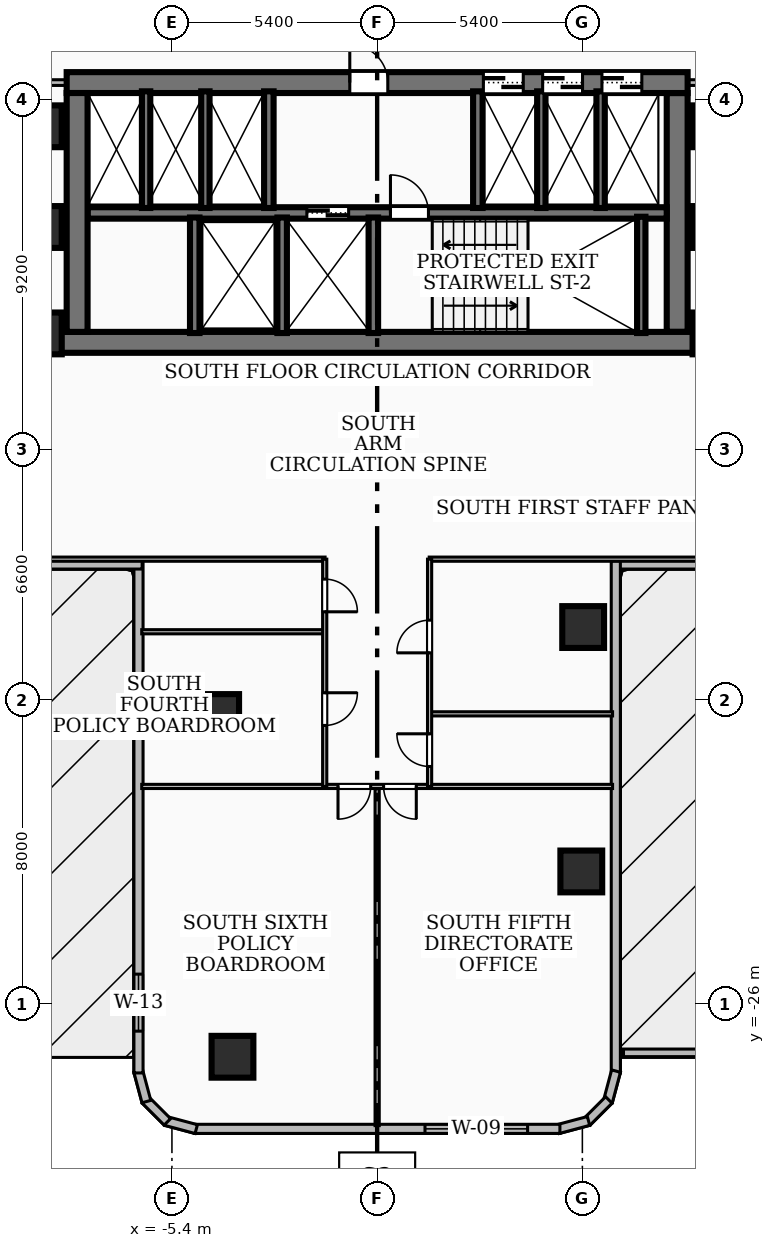
"""IFC4 building model, lengths in metres.
Left out: names, types, materials, properties, quantities, classifications, styles, units other than length and angle.
Written with IfcOpenShell. Run it as: python <this file> out.ifc"""

import sys

from ifc_helpers import new_model, si_unit, direction, frame, frame_2d, origin, origin_2d, place, context, subcontext, project, spatial, rectangle, extrude, element, fill, save


model = new_model("IFC4")
c1 = context("Model", 3, precision=1e-05, world=origin(), true_north=direction((0.0, 1.0)))
c2 = subcontext(c1, "Body", "Model", "MODEL_VIEW")
j1 = project(units=[si_unit("LENGTHUNIT", "METRE"), si_unit("PLANEANGLEUNIT", "RADIAN")], contexts=[c1])
p1 = place(None, origin())
s1 = spatial("IfcSite", under=j1, at=p1, CompositionType="ELEMENT")
p2 = place(p1, origin())
s2 = spatial("IfcBuilding", under=s1, at=p2, CompositionType="ELEMENT")
p3 = place(p2, frame((0.0, 0.0, 24.48)))
s3 = spatial("IfcBuildingStorey", under=s2, at=p3, CompositionType="ELEMENT", Elevation=24.48)
p4 = place(p3, frame((8.78, -8.585, 0.0), z_axis=(0.0, 0.0, 1.0), x_axis=(-1.0, 0.0, 0.0)))
e1 = element("IfcWall", 1, at=p4, inside=s3, PredefinedType="SHEAR", context=c2, shape_type="SweptSolid", body=[
    extrude(rectangle(XDim=17.56, YDim=0.55, at=frame_2d((8.78, 0.0))), origin(), (0.0, 0.0, 1.0), 3.34),
])
p5 = place(p3, frame((-8.17, -1.75, 0.0), z_axis=(0.0, 0.0, 1.0), x_axis=(1.0, 0.0, 0.0)))
e2 = element("IfcWall", 2, at=p5, inside=s3, PredefinedType="SHEAR", context=c2, shape_type="SweptSolid", body=[
    extrude(rectangle(XDim=16.34, YDim=0.55, at=frame_2d((8.17, 0.0))), origin(), (0.0, 0.0, 1.0), 3.34),
])
p6 = place(p5, frame((7.45, 0.0, 0.0)))
e3 = element("IfcOpeningElement", 3, at=p6, cuts=e2, PredefinedType="OPENING", context=c2, shape_type="SweptSolid", body=[
    extrude(rectangle(XDim=1.0, YDim=2.1, at=frame_2d((0.5, 1.05))), frame((0.0, 0.285, 0.0), z_axis=(0.0, -1.0, 0.0), x_axis=(1.0, 0.0, 0.0)), (0.0, 0.0, 1.0), 0.57),
])
p7 = place(p5, frame((10.965, 0.0, 0.0)))
e4 = element("IfcOpeningElement", 4, at=p7, cuts=e2, PredefinedType="OPENING", context=c2, shape_type="SweptSolid", body=[
    extrude(rectangle(XDim=1.05, YDim=2.15, at=frame_2d((0.525, 1.075))), frame((0.0, 0.285, 0.0), z_axis=(0.0, -1.0, 0.0), x_axis=(1.0, 0.0, 0.0)), (0.0, 0.0, 1.0), 0.57),
])
p8 = place(p5, frame((12.525, 0.0, 0.0)))
e5 = element("IfcOpeningElement", 5, at=p8, cuts=e2, PredefinedType="OPENING", context=c2, shape_type="SweptSolid", body=[
    extrude(rectangle(XDim=1.05, YDim=2.15, at=frame_2d((0.525, 1.075))), frame((0.0, 0.285, 0.0), z_axis=(0.0, -1.0, 0.0), x_axis=(1.0, 0.0, 0.0)), (0.0, 0.0, 1.0), 0.57),
])
p9 = place(p5, frame((14.085, 0.0, 0.0)))
e6 = element("IfcOpeningElement", 6, at=p9, cuts=e2, PredefinedType="OPENING", context=c2, shape_type="SweptSolid", body=[
    extrude(rectangle(XDim=1.05, YDim=2.15, at=frame_2d((0.525, 1.075))), frame((0.0, 0.285, 0.0), z_axis=(0.0, -1.0, 0.0), x_axis=(1.0, 0.0, 0.0)), (0.0, 0.0, 1.0), 0.57),
])
for number, where, z_axis, x_axis in (
    (7, (-7.895, -8.31, 0.0), (0.0, 0.0, 1.0), (0.0, 1.0, 0.0)),
    (8, (7.895, -2.025, 0.0), (0.0, 0.0, 1.0), (0.0, -1.0, 0.0)),
):
    element("IfcWall", number, at=place(p3, frame(where, z_axis=z_axis, x_axis=x_axis)), inside=s3, PredefinedType="SHEAR", context=c2, shape_type="SweptSolid", body=[
        extrude(rectangle(XDim=6.285, YDim=0.55, at=frame_2d((3.143, 0.0))), origin(), (0.0, 0.0, 1.0), 3.34),
    ])
p10 = place(p3, frame((-7.62, -5.18, 0.0), z_axis=(0.0, 0.0, 1.0), x_axis=(1.0, 0.0, 0.0)))
e9 = element("IfcWall", 9, at=p10, inside=s3, PredefinedType="SOLIDWALL", context=c2, shape_type="SweptSolid", body=[
    extrude(rectangle(XDim=15.24, YDim=0.3, at=frame_2d((7.62, 0.0))), origin(), (0.0, 0.0, 1.0), 3.34),
])
p11 = place(p10, frame((5.77, 0.0, 0.0)))
e10 = element("IfcOpeningElement", 10, at=p11, cuts=e9, PredefinedType="OPENING", context=c2, shape_type="SweptSolid", body=[
    extrude(rectangle(XDim=1.1, YDim=2.15, at=frame_2d((0.55, 1.075))), frame((0.0, 0.16, 0.0), z_axis=(0.0, -1.0, 0.0), x_axis=(1.0, 0.0, 0.0)), (0.0, 0.0, 1.0), 0.32),
])
p12 = place(p10, frame((7.97, 0.0, 0.0)))
e11 = element("IfcOpeningElement", 11, at=p12, cuts=e9, PredefinedType="OPENING", context=c2, shape_type="SweptSolid", body=[
    extrude(rectangle(XDim=1.0, YDim=2.1, at=frame_2d((0.5, 1.05))), frame((0.0, 0.16, 0.0), z_axis=(0.0, -1.0, 0.0), x_axis=(1.0, 0.0, 0.0)), (0.0, 0.0, 1.0), 0.32),
])
p13 = place(p3, frame((6.95, -8.34, 0.0), z_axis=(0.0, 0.0, 1.0), x_axis=(0.0, 1.0, 0.0)))
e12 = element("IfcWall", 12, at=p13, inside=s3, PredefinedType="SOLIDWALL", context=c2, shape_type="SweptSolid", body=[
    extrude(rectangle(XDim=3.06, YDim=0.22, at=frame_2d((1.53, 0.0))), origin(), (0.0, 0.0, 1.0), 3.34),
])
for number, where, z_axis, x_axis in (
    (13, (-0.1, -8.34, 0.0), (0.0, 0.0, 1.0), (0.0, 1.0, 0.0)),
    (14, (-2.5, -8.34, 0.0), (0.0, 0.0, 1.0), (0.0, 1.0, 0.0)),
    (15, (-4.8, -8.34, 0.0), (0.0, 0.0, 1.0), (0.0, 1.0, 0.0)),
):
    element("IfcWall", number, at=place(p3, frame(where, z_axis=z_axis, x_axis=x_axis)), inside=s3, PredefinedType="SOLIDWALL", context=c2, shape_type="SweptSolid", body=[
        extrude(rectangle(XDim=3.04, YDim=0.25, at=frame_2d((1.52, 0.0))), origin(), (0.0, 0.0, 1.0), 3.34),
    ])
for number, where, z_axis, x_axis in (
    (16, (-2.85, -5.05, 0.0), (0.0, 0.0, 1.0), (0.0, 1.0, 0.0)),
    (17, (2.65, -5.05, 0.0), (0.0, 0.0, 1.0), (0.0, 1.0, 0.0)),
):
    element("IfcWall", number, at=place(p3, frame(where, z_axis=z_axis, x_axis=x_axis)), inside=s3, PredefinedType="SOLIDWALL", context=c2, shape_type="SweptSolid", body=[
        extrude(rectangle(XDim=3.07, YDim=0.25, at=frame_2d((1.535, 0.0))), origin(), (0.0, 0.0, 1.0), 3.34),
    ])
for number, where, z_axis, x_axis in (
    (18, (4.32, -5.05, 0.0), (0.0, 0.0, 1.0), (0.0, 1.0, 0.0)),
    (19, (5.88, -5.05, 0.0), (0.0, 0.0, 1.0), (0.0, 1.0, 0.0)),
    (20, (-6.08, -5.05, 0.0), (0.0, 0.0, 1.0), (0.0, 1.0, 0.0)),
    (21, (-4.52, -5.05, 0.0), (0.0, 0.0, 1.0), (0.0, 1.0, 0.0)),
):
    element("IfcWall", number, at=place(p3, frame(where, z_axis=z_axis, x_axis=x_axis)), inside=s3, PredefinedType="SOLIDWALL", context=c2, shape_type="SweptSolid", body=[
        extrude(rectangle(XDim=3.07, YDim=0.22, at=frame_2d((1.535, 0.0))), origin(), (0.0, 0.0, 1.0), 3.34),
    ])
for number, where, z_axis, x_axis in (
    (22, (-8.85, -5.55, 0.0), (0.0, 0.0, 1.0), (1.0, 0.0, 0.0)),
    (23, (-8.85, -2.9, 0.0), (0.0, 0.0, 1.0), (1.0, 0.0, 0.0)),
    (24, (8.85, -5.55, 0.0), (0.0, 0.0, 1.0), (1.0, 0.0, 0.0)),
    (25, (8.85, -2.9, 0.0), (0.0, 0.0, 1.0), (1.0, 0.0, 0.0)),
    (26, (8.85, -8.35, 0.0), (0.0, 0.0, 1.0), (1.0, 0.0, 0.0)),
    (27, (-8.85, -8.35, 0.0), (0.0, 0.0, 1.0), (1.0, 0.0, 0.0)),
    (28, (-4.184, -18.391, 0.0), (0.0, 0.0, 1.0), (1.0, 0.0, 0.0)),
    (29, (5.421, -16.076, 0.0), (0.0, 0.0, 1.0), (1.0, 0.0, 0.0)),
    (30, (-3.807, -27.383, 0.0), (0.0, 0.0, 1.0), (1.0, 0.0, 0.0)),
    (31, (5.372, -22.507, 0.0), (0.0, 0.0, 1.0), (1.0, 0.0, 0.0)),
):
    element("IfcColumn", number, at=place(p3, frame(where, z_axis=z_axis, x_axis=x_axis)), inside=s3, PredefinedType="COLUMN", context=c2, shape_type="SweptSolid", body=[
        extrude(rectangle(XDim=1.1, YDim=1.1, at=origin_2d()), origin(), (0.0, 0.0, 1.0), 3.6),
    ])
p14 = place(p3, frame((12.959, -14.43, 0.0), z_axis=(0.0, 0.0, 1.0), x_axis=(-1.0, 0.0, 0.0)))
e32 = element("IfcWall", 32, at=p14, inside=s3, PredefinedType="SOLIDWALL", context=c2, shape_type="SweptSolid", body=[
    extrude(rectangle(XDim=6.775, YDim=0.24, at=frame_2d((3.387, 0.0))), origin(), (0.0, 0.0, 1.0), 2.421),
])
p15 = place(p3, frame((6.28, -14.334, 0.0), z_axis=(0.0, 0.0, 1.0), x_axis=(0.0, -1.0, 0.0)))
e33 = element("IfcWall", 33, at=p15, inside=s3, PredefinedType="SOLIDWALL", context=c2, shape_type="SweptSolid", body=[
    extrude(rectangle(XDim=13.475, YDim=0.24, at=frame_2d((6.738, 0.0))), origin(), (0.0, 0.0, 1.0), 2.421),
])
p16 = place(p3, frame((6.286, -27.76, 0.0), z_axis=(0.0, 0.0, 1.0), x_axis=(-0.25766265056, -0.966234939601, 0.0)))
e34 = element("IfcWall", 34, at=p16, inside=s3, PredefinedType="SOLIDWALL", context=c2, shape_type="SweptSolid", body=[
    extrude(rectangle(XDim=0.83, YDim=0.24, at=frame_2d((0.415, 0.0))), origin(), (0.0, 0.0, 1.0), 3.34),
])
p17 = place(p3, frame((6.096, -28.52, 0.0), z_axis=(0.0, 0.0, 1.0), x_axis=(-0.707106781187, -0.707106781187, 0.0)))
e35 = element("IfcWall", 35, at=p17, inside=s3, PredefinedType="SOLIDWALL", context=c2, shape_type="SweptSolid", body=[
    extrude(rectangle(XDim=0.814, YDim=0.24, at=frame_2d((0.407, 0.0))), origin(), (0.0, 0.0, 1.0), 3.34),
])
p18 = place(p3, frame((5.562, -29.072, 0.0), z_axis=(0.0, 0.0, 1.0), x_axis=(-0.966234939601, -0.25766265056, 0.0)))
e36 = element("IfcWall", 36, at=p18, inside=s3, PredefinedType="SOLIDWALL", context=c2, shape_type="SweptSolid", body=[
    extrude(rectangle(XDim=0.83, YDim=0.24, at=frame_2d((0.415, 0.0))), origin(), (0.0, 0.0, 1.0), 3.34),
])
p19 = place(p3, frame((4.809, -29.28, 0.0), z_axis=(0.0, 0.0, 1.0), x_axis=(-1.0, 0.0, 0.0)))
e37 = element("IfcWall", 37, at=p19, inside=s3, PredefinedType="SOLIDWALL", context=c2, shape_type="SweptSolid", body=[
    extrude(rectangle(XDim=9.618, YDim=0.24, at=frame_2d((4.809, 0.0))), origin(), (0.0, 0.0, 1.0), 3.34),
])
p20 = place(p19, frame((0.85, 0.0, 0.85)))
e38 = element("IfcOpeningElement", 38, at=p20, cuts=e37, PredefinedType="OPENING", context=c2, shape_type="SweptSolid", body=[
    extrude(rectangle(XDim=2.7, YDim=1.65, at=frame_2d((1.35, 0.825))), frame((0.0, 0.13, 0.0), z_axis=(0.0, -1.0, 0.0), x_axis=(1.0, 0.0, 0.0)), (0.0, 0.0, 1.0), 0.26),
])
p21 = place(p3, frame((-4.76, -29.286, 0.0), z_axis=(0.0, 0.0, 1.0), x_axis=(-0.966234939601, 0.25766265056, 0.0)))
e39 = element("IfcWall", 39, at=p21, inside=s3, PredefinedType="SOLIDWALL", context=c2, shape_type="SweptSolid", body=[
    extrude(rectangle(XDim=0.83, YDim=0.24, at=frame_2d((0.415, 0.0))), origin(), (0.0, 0.0, 1.0), 3.34),
])
p22 = place(p3, frame((-5.52, -29.096, 0.0), z_axis=(0.0, 0.0, 1.0), x_axis=(-0.707106781187, 0.707106781187, 0.0)))
e40 = element("IfcWall", 40, at=p22, inside=s3, PredefinedType="SOLIDWALL", context=c2, shape_type="SweptSolid", body=[
    extrude(rectangle(XDim=0.814, YDim=0.24, at=frame_2d((0.407, 0.0))), origin(), (0.0, 0.0, 1.0), 3.34),
])
p23 = place(p3, frame((-6.072, -28.562, 0.0), z_axis=(0.0, 0.0, 1.0), x_axis=(-0.25766265056, 0.966234939601, 0.0)))
e41 = element("IfcWall", 41, at=p23, inside=s3, PredefinedType="SOLIDWALL", context=c2, shape_type="SweptSolid", body=[
    extrude(rectangle(XDim=0.83, YDim=0.24, at=frame_2d((0.415, 0.0))), origin(), (0.0, 0.0, 1.0), 3.34),
])
p24 = place(p3, frame((-6.28, -27.809, 0.0), z_axis=(0.0, 0.0, 1.0), x_axis=(0.0, 1.0, 0.0)))
e42 = element("IfcWall", 42, at=p24, inside=s3, PredefinedType="SOLIDWALL", context=c2, shape_type="SweptSolid", body=[
    extrude(rectangle(XDim=13.475, YDim=0.24, at=frame_2d((6.738, 0.0))), origin(), (0.0, 0.0, 1.0), 3.34),
])
p25 = place(p24, frame((1.1, 0.0, 0.85)))
e43 = element("IfcOpeningElement", 43, at=p25, cuts=e42, PredefinedType="OPENING", context=c2, shape_type="SweptSolid", body=[
    extrude(rectangle(XDim=1.5, YDim=1.8, at=frame_2d((0.75, 0.9))), frame((0.0, 0.13, 0.0), z_axis=(0.0, -1.0, 0.0), x_axis=(1.0, 0.0, 0.0)), (0.0, 0.0, 1.0), 0.26),
])
p26 = place(p3, frame((-6.184, -14.43, 0.0), z_axis=(0.0, 0.0, 1.0), x_axis=(-1.0, 0.0, 0.0)))
e44 = element("IfcWall", 44, at=p26, inside=s3, PredefinedType="SOLIDWALL", context=c2, shape_type="SweptSolid", body=[
    extrude(rectangle(XDim=6.775, YDim=0.24, at=frame_2d((3.387, 0.0))), origin(), (0.0, 0.0, 1.0), 3.34),
])
p27 = place(p3, frame((6.482, -27.28, 0.0), z_axis=(0.0, 0.0, 1.0), x_axis=(1.0, 0.0, 0.0)))
e45 = element("IfcWall", 45, at=p27, inside=s3, PredefinedType="PARAPET", context=c2, shape_type="SweptSolid", body=[
    extrude(rectangle(XDim=26.938, YDim=0.2, at=frame_2d((13.469, 0.0))), origin(), (0.0, 0.0, 1.0), 0.88),
])
for number, where, z_axis, x_axis in (
    (46, (-7.85, -1.75, 0.0), (0.0, 0.0, 1.0), (-1.0, 0.0, 0.0)),
    (47, (7.85, -1.75, 0.0), (0.0, 0.0, 1.0), (1.0, 0.0, 0.0)),
):
    element("IfcWall", number, at=place(p3, frame(where, z_axis=z_axis, x_axis=x_axis)), inside=s3, PredefinedType="PARTITIONING", context=c2, shape_type="SweptSolid", body=[
        extrude(rectangle(XDim=1.67, YDim=0.15, at=frame_2d((0.835, 0.0))), origin(), (0.0, 0.0, 1.0), 2.405),
    ])
for number, where, z_axis, x_axis in (
    (48, (1.37, -14.29, 0.0), (0.0, 0.0, 1.0), (1.0, 0.0, 0.0)),
    (49, (-9.32, -14.29, 0.0), (0.0, 0.0, 1.0), (1.0, 0.0, 0.0)),
):
    element("IfcWall", number, at=place(p3, frame(where, z_axis=z_axis, x_axis=x_axis)), inside=s3, PredefinedType="PARTITIONING", context=c2, shape_type="SweptSolid", body=[
        extrude(rectangle(XDim=7.95, YDim=0.11, at=frame_2d((3.975, 0.0))), origin(), (0.0, 0.0, 1.0), 2.421),
    ])
for number, where, z_axis, x_axis in (
    (50, (1.4, -18.36, 0.0), (0.0, 0.0, 1.0), (1.0, 0.0, 0.0)),
    (51, (-6.195, -16.2, 0.0), (0.0, 0.0, 1.0), (1.0, 0.0, 0.0)),
):
    element("IfcWall", number, at=place(p3, frame(where, z_axis=z_axis, x_axis=x_axis)), inside=s3, PredefinedType="PARTITIONING", context=c2, shape_type="SweptSolid", body=[
        extrude(rectangle(XDim=4.795, YDim=0.11, at=frame_2d((2.397, 0.0))), origin(), (0.0, 0.0, 1.0), 2.421),
    ])
p28 = place(p3, frame((1.38, -20.27, 0.0), z_axis=(0.0, 0.0, 1.0), x_axis=(0.0, 1.0, 0.0)))
e52 = element("IfcWall", 52, at=p28, inside=s3, PredefinedType="PARTITIONING", context=c2, shape_type="SweptSolid", body=[
    extrude(rectangle(XDim=5.98, YDim=0.11, at=frame_2d((2.99, 0.0))), origin(), (0.0, 0.0, 1.0), 2.869),
])
p29 = place(p28, frame((3.515, 0.0, 0.0)))
e53 = element("IfcOpeningElement", 53, at=p29, cuts=e52, PredefinedType="OPENING", context=c2, shape_type="SweptSolid", body=[
    extrude(rectangle(XDim=0.86, YDim=2.04, at=frame_2d((0.43, 1.02))), frame((0.0, 0.065, 0.0), z_axis=(0.0, -1.0, 0.0), x_axis=(1.0, 0.0, 0.0)), (0.0, 0.0, 1.0), 0.13),
])
p30 = place(p28, frame((0.525, 0.0, 0.0)))
e54 = element("IfcOpeningElement", 54, at=p30, cuts=e52, PredefinedType="OPENING", context=c2, shape_type="SweptSolid", body=[
    extrude(rectangle(XDim=0.86, YDim=2.04, at=frame_2d((0.43, 1.02))), frame((0.0, 0.065, 0.0), z_axis=(0.0, -1.0, 0.0), x_axis=(1.0, 0.0, 0.0)), (0.0, 0.0, 1.0), 0.13),
])
p31 = place(p3, frame((-1.38, -14.29, 0.0), z_axis=(0.0, 0.0, 1.0), x_axis=(0.0, -1.0, 0.0)))
e55 = element("IfcWall", 55, at=p31, inside=s3, PredefinedType="PARTITIONING", context=c2, shape_type="SweptSolid", body=[
    extrude(rectangle(XDim=5.98, YDim=0.11, at=frame_2d((2.99, 0.0))), origin(), (0.0, 0.0, 1.0), 2.869),
])
p32 = place(p31, frame((0.525, 0.0, 0.0)))
e56 = element("IfcOpeningElement", 56, at=p32, cuts=e55, PredefinedType="OPENING", context=c2, shape_type="SweptSolid", body=[
    extrude(rectangle(XDim=0.86, YDim=2.04, at=frame_2d((0.43, 1.02))), frame((0.0, 0.065, 0.0), z_axis=(0.0, -1.0, 0.0), x_axis=(1.0, 0.0, 0.0)), (0.0, 0.0, 1.0), 0.13),
])
p33 = place(p31, frame((3.515, 0.0, 0.0)))
e57 = element("IfcOpeningElement", 57, at=p33, cuts=e55, PredefinedType="OPENING", context=c2, shape_type="SweptSolid", body=[
    extrude(rectangle(XDim=0.86, YDim=2.04, at=frame_2d((0.43, 1.02))), frame((0.0, 0.065, 0.0), z_axis=(0.0, -1.0, 0.0), x_axis=(1.0, 0.0, 0.0)), (0.0, 0.0, 1.0), 0.13),
])
p34 = place(p3, frame((0.0, -20.33, 0.0), z_axis=(0.0, 0.0, 1.0), x_axis=(0.0, -1.0, 0.0)))
e58 = element("IfcWall", 58, at=p34, inside=s3, PredefinedType="PARTITIONING", context=c2, shape_type="SweptSolid", body=[
    extrude(rectangle(XDim=8.865, YDim=0.11, at=frame_2d((4.433, 0.0))), origin(), (0.0, 0.0, 1.0), 2.72),
])
p35 = place(p3, frame((6.195, -20.27, 0.0), z_axis=(0.0, 0.0, 1.0), x_axis=(-1.0, 0.0, 0.0)))
e59 = element("IfcWall", 59, at=p35, inside=s3, PredefinedType="PARTITIONING", context=c2, shape_type="SweptSolid", body=[
    extrude(rectangle(XDim=12.39, YDim=0.11, at=frame_2d((6.195, 0.0))), origin(), (0.0, 0.0, 1.0), 2.421),
])
p36 = place(p35, frame((6.365, 0.0, 0.0)))
e60 = element("IfcOpeningElement", 60, at=p36, cuts=e59, PredefinedType="OPENING", context=c2, shape_type="SweptSolid", body=[
    extrude(rectangle(XDim=0.86, YDim=2.04, at=frame_2d((0.43, 1.02))), frame((0.0, 0.065, 0.0), z_axis=(0.0, -1.0, 0.0), x_axis=(1.0, 0.0, 0.0)), (0.0, 0.0, 1.0), 0.13),
])
p37 = place(p35, frame((5.165, 0.0, 0.0)))
e61 = element("IfcOpeningElement", 61, at=p37, cuts=e59, PredefinedType="OPENING", context=c2, shape_type="SweptSolid", body=[
    extrude(rectangle(XDim=0.86, YDim=2.04, at=frame_2d((0.43, 1.02))), frame((0.0, 0.065, 0.0), z_axis=(0.0, -1.0, 0.0), x_axis=(1.0, 0.0, 0.0)), (0.0, 0.0, 1.0), 0.13),
])
p38 = place(p20, origin())
e62 = element("IfcWindow", 62, at=p38, inside=s3, PartitioningType="SINGLE_PANEL", PredefinedType="WINDOW", context=c2, shape_type="SweptSolid", body=[
    extrude(rectangle(XDim=2.7, YDim=1.65, at=frame_2d((1.35, 0.825))), frame((0.0, 0.03, 0.0), z_axis=(0.0, -1.0, 0.0), x_axis=(1.0, 0.0, 0.0)), (0.0, 0.0, 1.0), 0.06),
])
fill(e38, e62)
p39 = place(p25, origin())
e63 = element("IfcWindow", 63, at=p39, inside=s3, PartitioningType="SINGLE_PANEL", PredefinedType="WINDOW", context=c2, shape_type="SweptSolid", body=[
    extrude(rectangle(XDim=1.5, YDim=1.8, at=frame_2d((0.75, 0.9))), frame((0.0, 0.03, 0.0), z_axis=(0.0, -1.0, 0.0), x_axis=(1.0, 0.0, 0.0)), (0.0, 0.0, 1.0), 0.06),
])
fill(e43, e63)
p40 = place(p6, origin())
e64 = element("IfcDoor", 64, at=p40, inside=s3, OperationType="SINGLE_SWING_LEFT", PredefinedType="DOOR", context=c2, shape_type="SweptSolid", body=[
    extrude(rectangle(XDim=1.0, YDim=2.1, at=frame_2d((0.5, 1.05))), frame((0.0, 0.025, 0.0), z_axis=(0.0, -1.0, 0.0), x_axis=(1.0, 0.0, 0.0)), (0.0, 0.0, 1.0), 0.05),
])
fill(e3, e64)
p41 = place(p11, origin())
e65 = element("IfcDoor", 65, at=p41, inside=s3, OperationType="DOUBLE_DOOR_SLIDING", PredefinedType="DOOR", context=c2, shape_type="SweptSolid", body=[
    extrude(rectangle(XDim=1.1, YDim=2.15, at=frame_2d((0.55, 1.075))), frame((0.0, 0.025, 0.0), z_axis=(0.0, -1.0, 0.0), x_axis=(1.0, 0.0, 0.0)), (0.0, 0.0, 1.0), 0.05),
])
fill(e10, e65)
p42 = place(p12, origin())
e66 = element("IfcDoor", 66, at=p42, inside=s3, OperationType="SINGLE_SWING_LEFT", PredefinedType="DOOR", context=c2, shape_type="SweptSolid", body=[
    extrude(rectangle(XDim=1.0, YDim=2.1, at=frame_2d((0.5, 1.05))), frame((0.0, 0.025, 0.0), z_axis=(0.0, -1.0, 0.0), x_axis=(1.0, 0.0, 0.0)), (0.0, 0.0, 1.0), 0.05),
])
fill(e11, e66)
p43 = place(p7, origin())
e67 = element("IfcDoor", 67, at=p43, inside=s3, OperationType="DOUBLE_DOOR_SLIDING", PredefinedType="DOOR", context=c2, shape_type="SweptSolid", body=[
    extrude(rectangle(XDim=1.05, YDim=2.15, at=frame_2d((0.525, 1.075))), frame((0.0, 0.025, 0.0), z_axis=(0.0, -1.0, 0.0), x_axis=(1.0, 0.0, 0.0)), (0.0, 0.0, 1.0), 0.05),
])
fill(e4, e67)
p44 = place(p8, origin())
e68 = element("IfcDoor", 68, at=p44, inside=s3, OperationType="DOUBLE_DOOR_SLIDING", PredefinedType="DOOR", context=c2, shape_type="SweptSolid", body=[
    extrude(rectangle(XDim=1.05, YDim=2.15, at=frame_2d((0.525, 1.075))), frame((0.0, 0.025, 0.0), z_axis=(0.0, -1.0, 0.0), x_axis=(1.0, 0.0, 0.0)), (0.0, 0.0, 1.0), 0.05),
])
fill(e5, e68)
p45 = place(p9, origin())
e69 = element("IfcDoor", 69, at=p45, inside=s3, OperationType="DOUBLE_DOOR_SLIDING", PredefinedType="DOOR", context=c2, shape_type="SweptSolid", body=[
    extrude(rectangle(XDim=1.05, YDim=2.15, at=frame_2d((0.525, 1.075))), frame((0.0, 0.025, 0.0), z_axis=(0.0, -1.0, 0.0), x_axis=(1.0, 0.0, 0.0)), (0.0, 0.0, 1.0), 0.05),
])
fill(e6, e69)
p46 = place(p29, origin())
e70 = element("IfcDoor", 70, at=p46, inside=s3, OperationType="SINGLE_SWING_LEFT", PredefinedType="DOOR", context=c2, shape_type="SweptSolid", body=[
    extrude(rectangle(XDim=0.86, YDim=2.04, at=frame_2d((0.43, 1.02))), frame((0.0, 0.025, 0.0), z_axis=(0.0, -1.0, 0.0), x_axis=(1.0, 0.0, 0.0)), (0.0, 0.0, 1.0), 0.05),
])
fill(e53, e70)
p47 = place(p30, origin())
e71 = element("IfcDoor", 71, at=p47, inside=s3, OperationType="SINGLE_SWING_RIGHT", PredefinedType="DOOR", context=c2, shape_type="SweptSolid", body=[
    extrude(rectangle(XDim=0.86, YDim=2.04, at=frame_2d((0.43, 1.02))), frame((0.0, 0.025, 0.0), z_axis=(0.0, -1.0, 0.0), x_axis=(1.0, 0.0, 0.0)), (0.0, 0.0, 1.0), 0.05),
])
fill(e54, e71)
p48 = place(p32, origin())
e72 = element("IfcDoor", 72, at=p48, inside=s3, OperationType="SINGLE_SWING_RIGHT", PredefinedType="DOOR", context=c2, shape_type="SweptSolid", body=[
    extrude(rectangle(XDim=0.86, YDim=2.04, at=frame_2d((0.43, 1.02))), frame((0.0, 0.025, 0.0), z_axis=(0.0, -1.0, 0.0), x_axis=(1.0, 0.0, 0.0)), (0.0, 0.0, 1.0), 0.05),
])
fill(e56, e72)
p49 = place(p33, origin())
e73 = element("IfcDoor", 73, at=p49, inside=s3, OperationType="SINGLE_SWING_LEFT", PredefinedType="DOOR", context=c2, shape_type="SweptSolid", body=[
    extrude(rectangle(XDim=0.86, YDim=2.04, at=frame_2d((0.43, 1.02))), frame((0.0, 0.025, 0.0), z_axis=(0.0, -1.0, 0.0), x_axis=(1.0, 0.0, 0.0)), (0.0, 0.0, 1.0), 0.05),
])
fill(e57, e73)
p50 = place(p36, origin())
e74 = element("IfcDoor", 74, at=p50, inside=s3, OperationType="SINGLE_SWING_RIGHT", PredefinedType="DOOR", context=c2, shape_type="SweptSolid", body=[
    extrude(rectangle(XDim=0.86, YDim=2.04, at=frame_2d((0.43, 1.02))), frame((0.0, 0.025, 0.0), z_axis=(0.0, -1.0, 0.0), x_axis=(1.0, 0.0, 0.0)), (0.0, 0.0, 1.0), 0.05),
])
fill(e60, e74)
p51 = place(p37, origin())
e75 = element("IfcDoor", 75, at=p51, inside=s3, OperationType="SINGLE_SWING_LEFT", PredefinedType="DOOR", context=c2, shape_type="SweptSolid", body=[
    extrude(rectangle(XDim=0.86, YDim=2.04, at=frame_2d((0.43, 1.02))), frame((0.0, 0.025, 0.0), z_axis=(0.0, -1.0, 0.0), x_axis=(1.0, 0.0, 0.0)), (0.0, 0.0, 1.0), 0.05),
])
fill(e61, e75)
save(model, sys.argv[1])
